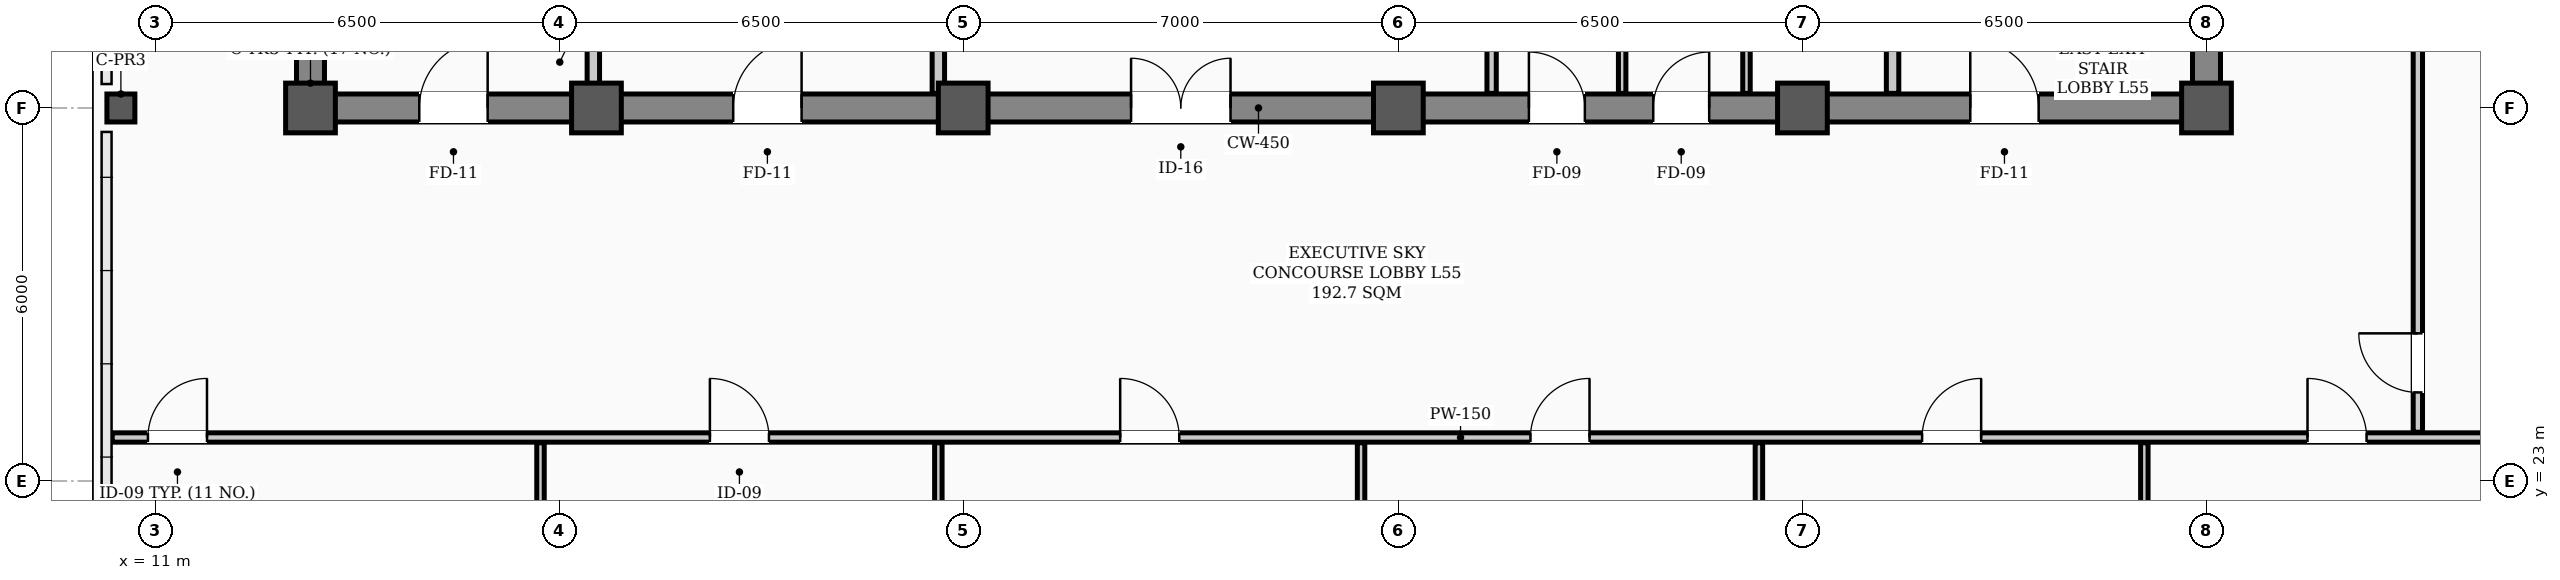
"""IFC4 building model, lengths in metres.
Left out: names, types, materials, properties, quantities, classifications, styles, units other than length and angle.
Written with IfcOpenShell. Run it as: python <this file> out.ifc"""

import sys

from ifc_helpers import new_model, si_unit, direction, frame, frame_2d, origin, origin_2d, place, context, subcontext, project, spatial, rectangle, hollow_rectangle, extrude, element, fill, save


model = new_model("IFC4")
c1 = context("Model", 3, precision=1e-05, world=origin(), true_north=direction((0.0, 1.0)))
c2 = subcontext(c1, "Body", "Model", "MODEL_VIEW")
j1 = project(units=[si_unit("LENGTHUNIT", "METRE"), si_unit("PLANEANGLEUNIT", "RADIAN")], contexts=[c1])
p1 = place(None, origin())
s1 = spatial("IfcSite", under=j1, at=p1, CompositionType="ELEMENT")
p2 = place(p1, origin())
s2 = spatial("IfcBuilding", under=s1, at=p2, CompositionType="ELEMENT")
p3 = place(p2, frame((0.0, 0.0, 222.8)))
s3 = spatial("IfcBuildingStorey", under=s2, at=p3, CompositionType="ELEMENT", Elevation=222.8)
for number, where, z_axis, x_axis in (
    (1, (13.5, 29.0, 0.0), (0.0, 0.0, 1.0), (1.0, 0.0, 0.0)),
    (2, (18.1, 29.0, 0.0), (0.0, 0.0, 1.0), (1.0, 0.0, 0.0)),
    (3, (24.0, 29.0, 0.0), (0.0, 0.0, 1.0), (1.0, 0.0, 0.0)),
    (4, (31.0, 29.0, 0.0), (0.0, 0.0, 1.0), (1.0, 0.0, 0.0)),
    (5, (37.5, 29.0, 0.0), (0.0, 0.0, 1.0), (1.0, 0.0, 0.0)),
    (6, (44.0, 29.0, 0.0), (0.0, 0.0, 1.0), (1.0, 0.0, 0.0)),
):
    element("IfcColumn", number, at=place(p3, frame(where, z_axis=z_axis, x_axis=x_axis)), inside=s3, PredefinedType="COLUMN", context=c2, shape_type="SweptSolid", body=[
        extrude(hollow_rectangle(XDim=0.8, YDim=0.8, WallThickness=0.032, InnerFilletRadius=0.016, OuterFilletRadius=0.048, at=origin_2d()), origin(), (0.0, 0.0, 1.0), 3.9),
    ])
p4 = place(p3, frame((10.45, 29.0, 0.0), z_axis=(0.0, 0.0, 1.0), x_axis=(1.0, 0.0, 0.0)))
e7 = element("IfcColumn", 7, at=p4, inside=s3, PredefinedType="COLUMN", context=c2, shape_type="SweptSolid", body=[
    extrude(hollow_rectangle(XDim=0.45, YDim=0.45, WallThickness=0.022, InnerFilletRadius=0.022, OuterFilletRadius=0.044, at=origin_2d()), origin(), (0.0, 0.0, 1.0), 3.9),
])
p5 = place(p3, frame((13.5, 29.0, 0.0), z_axis=(0.0, 0.0, 1.0), x_axis=(1.0, 0.0, 0.0)))
e8 = element("IfcWall", 8, at=p5, inside=s3, PredefinedType="SHEAR", context=c2, shape_type="SweptSolid", body=[
    extrude(rectangle(XDim=30.5, YDim=0.45, at=frame_2d((15.25, 0.0))), origin(), (0.0, 0.0, 1.0), 3.72),
])
p6 = place(p5, frame((1.75, 0.0, 0.0)))
e9 = element("IfcOpeningElement", 9, at=p6, cuts=e8, PredefinedType="OPENING", context=c2, shape_type="SweptSolid", body=[
    extrude(rectangle(XDim=1.1, YDim=2.08, at=frame_2d((0.55, 1.04))), frame((0.0, 0.235, 0.0), z_axis=(0.0, -1.0, 0.0), x_axis=(1.0, 0.0, 0.0)), (0.0, 0.0, 1.0), 0.47),
])
p7 = place(p5, frame((26.7, 0.0, 0.0)))
e10 = element("IfcOpeningElement", 10, at=p7, cuts=e8, PredefinedType="OPENING", context=c2, shape_type="SweptSolid", body=[
    extrude(rectangle(XDim=1.1, YDim=2.08, at=frame_2d((0.55, 1.04))), frame((0.0, 0.235, 0.0), z_axis=(0.0, -1.0, 0.0), x_axis=(1.0, 0.0, 0.0)), (0.0, 0.0, 1.0), 0.47),
])
p8 = place(p5, frame((6.8, 0.0, 0.0)))
e11 = element("IfcOpeningElement", 11, at=p8, cuts=e8, PredefinedType="OPENING", context=c2, shape_type="SweptSolid", body=[
    extrude(rectangle(XDim=1.1, YDim=2.08, at=frame_2d((0.55, 1.04))), frame((0.0, 0.235, 0.0), z_axis=(0.0, -1.0, 0.0), x_axis=(1.0, 0.0, 0.0)), (0.0, 0.0, 1.0), 0.47),
])
p9 = place(p5, frame((13.2, 0.0, 0.0)))
e12 = element("IfcOpeningElement", 12, at=p9, cuts=e8, PredefinedType="OPENING", context=c2, shape_type="SweptSolid", body=[
    extrude(rectangle(XDim=1.6, YDim=2.08, at=frame_2d((0.8, 1.04))), frame((0.0, 0.235, 0.0), z_axis=(0.0, -1.0, 0.0), x_axis=(1.0, 0.0, 0.0)), (0.0, 0.0, 1.0), 0.47),
])
p10 = place(p5, frame((19.6, 0.0, 0.0)))
e13 = element("IfcOpeningElement", 13, at=p10, cuts=e8, PredefinedType="OPENING", context=c2, shape_type="SweptSolid", body=[
    extrude(rectangle(XDim=0.9, YDim=2.08, at=frame_2d((0.45, 1.04))), frame((0.0, 0.235, 0.0), z_axis=(0.0, -1.0, 0.0), x_axis=(1.0, 0.0, 0.0)), (0.0, 0.0, 1.0), 0.47),
])
p11 = place(p5, frame((21.6, 0.0, 0.0)))
e14 = element("IfcOpeningElement", 14, at=p11, cuts=e8, PredefinedType="OPENING", context=c2, shape_type="SweptSolid", body=[
    extrude(rectangle(XDim=0.9, YDim=2.08, at=frame_2d((0.45, 1.04))), frame((0.0, 0.235, 0.0), z_axis=(0.0, -1.0, 0.0), x_axis=(1.0, 0.0, 0.0)), (0.0, 0.0, 1.0), 0.47),
])
for number, where, z_axis, x_axis in (
    (15, (13.5, 29.35, 0.0), (0.0, 0.0, 1.0), (0.0, 1.0, 0.0)),
    (16, (44.0, 29.35, 0.0), (0.0, 0.0, 1.0), (0.0, 1.0, 0.0)),
):
    element("IfcWall", number, at=place(p3, frame(where, z_axis=z_axis, x_axis=x_axis)), inside=s3, PredefinedType="SHEAR", context=c2, shape_type="SweptSolid", body=[
        extrude(rectangle(XDim=8.6, YDim=0.45, at=frame_2d((4.3, 0.0))), origin(), (0.0, 0.0, 1.0), 3.72),
    ])
p12 = place(p3, frame((10.31, 23.7, 0.0), z_axis=(0.0, 0.0, 1.0), x_axis=(1.0, 0.0, 0.0)))
e17 = element("IfcWall", 17, at=p12, inside=s3, PredefinedType="PARTITIONING", context=c2, shape_type="SweptSolid", body=[
    extrude(rectangle(XDim=43.38, YDim=0.15, at=frame_2d((21.69, 0.0))), origin(), (0.0, 0.0, 1.0), 3.2),
])
p13 = place(p12, frame((0.575, 0.0, 0.0)))
e18 = element("IfcOpeningElement", 18, at=p13, cuts=e17, PredefinedType="OPENING", context=c2, shape_type="SweptSolid", body=[
    extrude(rectangle(XDim=0.95, YDim=2.08, at=frame_2d((0.475, 1.04))), frame((0.0, 0.085, 0.0), z_axis=(0.0, -1.0, 0.0), x_axis=(1.0, 0.0, 0.0)), (0.0, 0.0, 1.0), 0.17),
])
p14 = place(p12, frame((9.615, 0.0, 0.0)))
e19 = element("IfcOpeningElement", 19, at=p14, cuts=e17, PredefinedType="OPENING", context=c2, shape_type="SweptSolid", body=[
    extrude(rectangle(XDim=0.95, YDim=2.08, at=frame_2d((0.475, 1.04))), frame((0.0, 0.085, 0.0), z_axis=(0.0, -1.0, 0.0), x_axis=(1.0, 0.0, 0.0)), (0.0, 0.0, 1.0), 0.17),
])
p15 = place(p12, frame((16.215, 0.0, 0.0)))
e20 = element("IfcOpeningElement", 20, at=p15, cuts=e17, PredefinedType="OPENING", context=c2, shape_type="SweptSolid", body=[
    extrude(rectangle(XDim=0.95, YDim=2.08, at=frame_2d((0.475, 1.04))), frame((0.0, 0.085, 0.0), z_axis=(0.0, -1.0, 0.0), x_axis=(1.0, 0.0, 0.0)), (0.0, 0.0, 1.0), 0.17),
])
p16 = place(p12, frame((22.815, 0.0, 0.0)))
e21 = element("IfcOpeningElement", 21, at=p16, cuts=e17, PredefinedType="OPENING", context=c2, shape_type="SweptSolid", body=[
    extrude(rectangle(XDim=0.95, YDim=2.08, at=frame_2d((0.475, 1.04))), frame((0.0, 0.085, 0.0), z_axis=(0.0, -1.0, 0.0), x_axis=(1.0, 0.0, 0.0)), (0.0, 0.0, 1.0), 0.17),
])
p17 = place(p12, frame((29.115, 0.0, 0.0)))
e22 = element("IfcOpeningElement", 22, at=p17, cuts=e17, PredefinedType="OPENING", context=c2, shape_type="SweptSolid", body=[
    extrude(rectangle(XDim=0.95, YDim=2.08, at=frame_2d((0.475, 1.04))), frame((0.0, 0.085, 0.0), z_axis=(0.0, -1.0, 0.0), x_axis=(1.0, 0.0, 0.0)), (0.0, 0.0, 1.0), 0.17),
])
p18 = place(p12, frame((35.315, 0.0, 0.0)))
e23 = element("IfcOpeningElement", 23, at=p18, cuts=e17, PredefinedType="OPENING", context=c2, shape_type="SweptSolid", body=[
    extrude(rectangle(XDim=0.95, YDim=2.08, at=frame_2d((0.475, 1.04))), frame((0.0, 0.085, 0.0), z_axis=(0.0, -1.0, 0.0), x_axis=(1.0, 0.0, 0.0)), (0.0, 0.0, 1.0), 0.17),
])
for number, where, z_axis, x_axis in (
    (24, (18.05, 29.235, 0.0), (0.0, 0.0, 1.0), (0.0, 1.0, 0.0)),
    (25, (38.95, 29.235, 0.0), (0.0, 0.0, 1.0), (0.0, 1.0, 0.0)),
):
    element("IfcWall", number, at=place(p3, frame(where, z_axis=z_axis, x_axis=x_axis)), inside=s3, PredefinedType="STANDARD", context=c2, shape_type="SweptSolid", body=[
        extrude(rectangle(XDim=1.065, YDim=0.2, at=frame_2d((0.532, 0.0))), origin(), (0.0, 0.0, 1.0), 3.35),
    ])
p19 = place(p3, frame((23.6, 29.235, 0.0), z_axis=(0.0, 0.0, 1.0), x_axis=(0.0, 1.0, 0.0)))
e26 = element("IfcWall", 26, at=p19, inside=s3, PredefinedType="STANDARD", context=c2, shape_type="SweptSolid", body=[
    extrude(rectangle(XDim=5.465, YDim=0.2, at=frame_2d((2.732, 0.0))), origin(), (0.0, 0.0, 1.0), 3.2),
])
p20 = place(p3, frame((32.5, 29.235, 0.0), z_axis=(0.0, 0.0, 1.0), x_axis=(0.0, 1.0, 0.0)))
e27 = element("IfcWall", 27, at=p20, inside=s3, PredefinedType="PARTITIONING", context=c2, shape_type="SweptSolid", body=[
    extrude(rectangle(XDim=2.53, YDim=0.15, at=frame_2d((1.265, 0.0))), origin(), (0.0, 0.0, 1.0), 3.35),
])
for number, where, z_axis, x_axis in (
    (28, (36.6, 29.235, 0.0), (0.0, 0.0, 1.0), (0.0, 1.0, 0.0)),
    (29, (34.6, 29.235, 0.0), (0.0, 0.0, 1.0), (0.0, 1.0, 0.0)),
):
    element("IfcWall", number, at=place(p3, frame(where, z_axis=z_axis, x_axis=x_axis)), inside=s3, PredefinedType="PARTITIONING", context=c2, shape_type="SweptSolid", body=[
        extrude(rectangle(XDim=2.53, YDim=0.12, at=frame_2d((1.265, 0.0))), origin(), (0.0, 0.0, 1.0), 3.35),
    ])
p21 = place(p3, frame((47.4, 23.785, 0.0), z_axis=(0.0, 0.0, 1.0), x_axis=(0.0, 1.0, 0.0)))
e30 = element("IfcWall", 30, at=p21, inside=s3, PredefinedType="PARTITIONING", context=c2, shape_type="SweptSolid", body=[
    extrude(rectangle(XDim=13.13, YDim=0.15, at=frame_2d((6.565, 0.0))), origin(), (0.0, 0.0, 1.0), 3.1),
])
p22 = place(p21, frame((0.64, 0.0, 0.0)))
e31 = element("IfcOpeningElement", 31, at=p22, cuts=e30, PredefinedType="OPENING", context=c2, shape_type="SweptSolid", body=[
    extrude(rectangle(XDim=0.95, YDim=2.08, at=frame_2d((0.475, 1.04))), frame((0.0, 0.085, 0.0), z_axis=(0.0, -1.0, 0.0), x_axis=(1.0, 0.0, 0.0)), (0.0, 0.0, 1.0), 0.17),
])
p23 = place(p21, frame((10.44, 0.0, 0.0)))
e32 = element("IfcOpeningElement", 32, at=p23, cuts=e30, PredefinedType="OPENING", context=c2, shape_type="SweptSolid", body=[
    extrude(rectangle(XDim=0.95, YDim=2.08, at=frame_2d((0.475, 1.04))), frame((0.0, 0.085, 0.0), z_axis=(0.0, -1.0, 0.0), x_axis=(1.0, 0.0, 0.0)), (0.0, 0.0, 1.0), 0.17),
])
p24 = place(p3, frame((17.2, 11.56, 0.0), z_axis=(0.0, 0.0, 1.0), x_axis=(0.0, 1.0, 0.0)))
e33 = element("IfcWall", 33, at=p24, inside=s3, PredefinedType="PARTITIONING", context=c2, shape_type="SweptSolid", body=[
    extrude(rectangle(XDim=12.055, YDim=0.12, at=frame_2d((6.027, 0.0))), origin(), (0.0, 0.0, 1.0), 3.1),
])
p25 = place(p3, frame((23.6, 13.32, 0.0), z_axis=(0.0, 0.0, 1.0), x_axis=(0.0, 1.0, 0.0)))
e34 = element("IfcWall", 34, at=p25, inside=s3, PredefinedType="PARTITIONING", context=c2, shape_type="SweptSolid", body=[
    extrude(rectangle(XDim=10.295, YDim=0.12, at=frame_2d((5.147, 0.0))), origin(), (0.0, 0.0, 1.0), 3.1),
])
for number, where, z_axis, x_axis in (
    (35, (30.4, 11.56, 0.0), (0.0, 0.0, 1.0), (0.0, 1.0, 0.0)),
    (36, (36.8, 11.56, 0.0), (0.0, 0.0, 1.0), (0.0, 1.0, 0.0)),
    (37, (43.0, 11.56, 0.0), (0.0, 0.0, 1.0), (0.0, 1.0, 0.0)),
):
    element("IfcWall", number, at=place(p3, frame(where, z_axis=z_axis, x_axis=x_axis)), inside=s3, PredefinedType="PARTITIONING", context=c2, shape_type="SweptSolid", body=[
        extrude(rectangle(XDim=12.055, YDim=0.12, at=frame_2d((6.027, 0.0))), origin(), (0.0, 0.0, 1.0), 3.1),
    ])
p26 = place(p6, origin())
e38 = element("IfcDoor", 38, at=p26, inside=s3, OperationType="SINGLE_SWING_RIGHT", PredefinedType="DOOR", context=c2, shape_type="SweptSolid", body=[
    extrude(rectangle(XDim=1.1, YDim=2.08, at=frame_2d((0.55, 1.04))), frame((0.0, 0.025, 0.0), z_axis=(0.0, -1.0, 0.0), x_axis=(1.0, 0.0, 0.0)), (0.0, 0.0, 1.0), 0.05),
])
fill(e9, e38)
p27 = place(p7, origin())
e39 = element("IfcDoor", 39, at=p27, inside=s3, OperationType="SINGLE_SWING_LEFT", PredefinedType="DOOR", context=c2, shape_type="SweptSolid", body=[
    extrude(rectangle(XDim=1.1, YDim=2.08, at=frame_2d((0.55, 1.04))), frame((0.0, 0.025, 0.0), z_axis=(0.0, -1.0, 0.0), x_axis=(1.0, 0.0, 0.0)), (0.0, 0.0, 1.0), 0.05),
])
fill(e10, e39)
p28 = place(p8, origin())
e40 = element("IfcDoor", 40, at=p28, inside=s3, OperationType="SINGLE_SWING_RIGHT", PredefinedType="DOOR", context=c2, shape_type="SweptSolid", body=[
    extrude(rectangle(XDim=1.1, YDim=2.08, at=frame_2d((0.55, 1.04))), frame((0.0, 0.025, 0.0), z_axis=(0.0, -1.0, 0.0), x_axis=(1.0, 0.0, 0.0)), (0.0, 0.0, 1.0), 0.05),
])
fill(e11, e40)
p29 = place(p9, origin())
e41 = element("IfcDoor", 41, at=p29, inside=s3, OperationType="DOUBLE_DOOR_SINGLE_SWING", PredefinedType="DOOR", context=c2, shape_type="SweptSolid", body=[
    extrude(rectangle(XDim=1.6, YDim=2.08, at=frame_2d((0.8, 1.04))), frame((0.0, 0.025, 0.0), z_axis=(0.0, -1.0, 0.0), x_axis=(1.0, 0.0, 0.0)), (0.0, 0.0, 1.0), 0.05),
])
fill(e12, e41)
p30 = place(p10, origin())
e42 = element("IfcDoor", 42, at=p30, inside=s3, OperationType="SINGLE_SWING_LEFT", PredefinedType="DOOR", context=c2, shape_type="SweptSolid", body=[
    extrude(rectangle(XDim=0.9, YDim=2.08, at=frame_2d((0.45, 1.04))), frame((0.0, 0.025, 0.0), z_axis=(0.0, -1.0, 0.0), x_axis=(1.0, 0.0, 0.0)), (0.0, 0.0, 1.0), 0.05),
])
fill(e13, e42)
p31 = place(p11, origin())
e43 = element("IfcDoor", 43, at=p31, inside=s3, OperationType="SINGLE_SWING_RIGHT", PredefinedType="DOOR", context=c2, shape_type="SweptSolid", body=[
    extrude(rectangle(XDim=0.9, YDim=2.08, at=frame_2d((0.45, 1.04))), frame((0.0, 0.025, 0.0), z_axis=(0.0, -1.0, 0.0), x_axis=(1.0, 0.0, 0.0)), (0.0, 0.0, 1.0), 0.05),
])
fill(e14, e43)
p32 = place(p13, origin())
e44 = element("IfcDoor", 44, at=p32, inside=s3, OperationType="SINGLE_SWING_RIGHT", PredefinedType="DOOR", context=c2, shape_type="SweptSolid", body=[
    extrude(rectangle(XDim=0.95, YDim=2.08, at=frame_2d((0.475, 1.04))), frame((0.0, 0.025, 0.0), z_axis=(0.0, -1.0, 0.0), x_axis=(1.0, 0.0, 0.0)), (0.0, 0.0, 1.0), 0.05),
])
fill(e18, e44)
p33 = place(p14, origin())
e45 = element("IfcDoor", 45, at=p33, inside=s3, OperationType="SINGLE_SWING_LEFT", PredefinedType="DOOR", context=c2, shape_type="SweptSolid", body=[
    extrude(rectangle(XDim=0.95, YDim=2.08, at=frame_2d((0.475, 1.04))), frame((0.0, 0.025, 0.0), z_axis=(0.0, -1.0, 0.0), x_axis=(1.0, 0.0, 0.0)), (0.0, 0.0, 1.0), 0.05),
])
fill(e19, e45)
p34 = place(p15, origin())
e46 = element("IfcDoor", 46, at=p34, inside=s3, OperationType="SINGLE_SWING_LEFT", PredefinedType="DOOR", context=c2, shape_type="SweptSolid", body=[
    extrude(rectangle(XDim=0.95, YDim=2.08, at=frame_2d((0.475, 1.04))), frame((0.0, 0.025, 0.0), z_axis=(0.0, -1.0, 0.0), x_axis=(1.0, 0.0, 0.0)), (0.0, 0.0, 1.0), 0.05),
])
fill(e20, e46)
p35 = place(p16, origin())
e47 = element("IfcDoor", 47, at=p35, inside=s3, OperationType="SINGLE_SWING_RIGHT", PredefinedType="DOOR", context=c2, shape_type="SweptSolid", body=[
    extrude(rectangle(XDim=0.95, YDim=2.08, at=frame_2d((0.475, 1.04))), frame((0.0, 0.025, 0.0), z_axis=(0.0, -1.0, 0.0), x_axis=(1.0, 0.0, 0.0)), (0.0, 0.0, 1.0), 0.05),
])
fill(e21, e47)
p36 = place(p17, origin())
e48 = element("IfcDoor", 48, at=p36, inside=s3, OperationType="SINGLE_SWING_RIGHT", PredefinedType="DOOR", context=c2, shape_type="SweptSolid", body=[
    extrude(rectangle(XDim=0.95, YDim=2.08, at=frame_2d((0.475, 1.04))), frame((0.0, 0.025, 0.0), z_axis=(0.0, -1.0, 0.0), x_axis=(1.0, 0.0, 0.0)), (0.0, 0.0, 1.0), 0.05),
])
fill(e22, e48)
p37 = place(p18, origin())
e49 = element("IfcDoor", 49, at=p37, inside=s3, OperationType="SINGLE_SWING_LEFT", PredefinedType="DOOR", context=c2, shape_type="SweptSolid", body=[
    extrude(rectangle(XDim=0.95, YDim=2.08, at=frame_2d((0.475, 1.04))), frame((0.0, 0.025, 0.0), z_axis=(0.0, -1.0, 0.0), x_axis=(1.0, 0.0, 0.0)), (0.0, 0.0, 1.0), 0.05),
])
fill(e23, e49)
p38 = place(p22, origin())
e50 = element("IfcDoor", 50, at=p38, inside=s3, OperationType="SINGLE_SWING_RIGHT", PredefinedType="DOOR", context=c2, shape_type="SweptSolid", body=[
    extrude(rectangle(XDim=0.95, YDim=2.08, at=frame_2d((0.475, 1.04))), frame((0.0, 0.025, 0.0), z_axis=(0.0, -1.0, 0.0), x_axis=(1.0, 0.0, 0.0)), (0.0, 0.0, 1.0), 0.05),
])
fill(e31, e50)
save(model, sys.argv[1])
